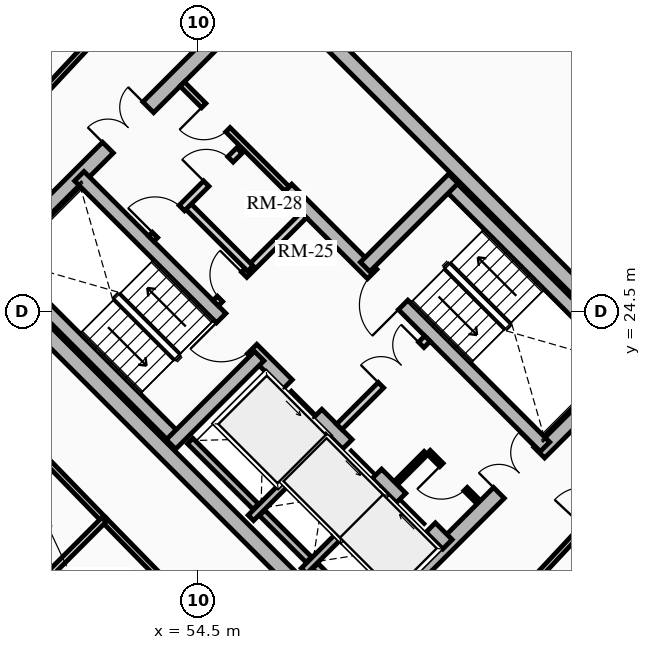
"""IFC4 building model, lengths in metres.
Left out: names, types, materials, properties, quantities, classifications, styles, units other than length and angle.
Written with IfcOpenShell. Run it as: python <this file> out.ifc"""

import sys

from ifc_helpers import new_model, si_unit, direction, frame, frame_2d, origin, place, context, subcontext, project, spatial, rectangle, extrude, source, transform, mapped, element, fill, save


model = new_model("IFC4")
c1 = context("Model", 3, precision=1e-05, world=origin(), true_north=direction((0.0, 1.0)))
c2 = subcontext(c1, "Body", "Model", "MODEL_VIEW")
j1 = project(units=[si_unit("LENGTHUNIT", "METRE"), si_unit("PLANEANGLEUNIT", "RADIAN")], contexts=[c1])
p1 = place(None, origin())
s1 = spatial("IfcSite", under=j1, at=p1, CompositionType="ELEMENT")
p2 = place(p1, origin())
s2 = spatial("IfcBuilding", under=s1, at=p2, CompositionType="ELEMENT")
p3 = place(p2, frame((0.0, 0.0, 157.42)))
s3 = spatial("IfcBuildingStorey", under=s2, at=p3, CompositionType="ELEMENT", Elevation=157.42)
for number, where, z_axis, x_axis in (
    (1, (58.702, 15.732, 0.0), (0.0, 0.0, 1.0), (-0.707, 0.707, 0.0)),
    (2, (66.268, 23.298, 0.0), (0.0, 0.0, 1.0), (-0.707, 0.707, 0.0)),
):
    element("IfcWall", number, at=place(p3, frame(where, z_axis=z_axis, x_axis=x_axis)), inside=s3, PredefinedType="SHEAR", context=c2, shape_type="SweptSolid", body=[
        extrude(rectangle(XDim=14.1, YDim=0.4, at=frame_2d((7.05, 0.0))), origin(), (0.0, 0.0, 1.0), 2.91),
    ])
p4 = place(p3, frame((58.561, 15.873, 0.0), z_axis=(0.0, 0.0, 1.0), x_axis=(0.707106781187, 0.707106781187, 0.0)))
e3 = element("IfcWall", 3, at=p4, inside=s3, PredefinedType="SHEAR", context=c2, shape_type="SweptSolid", body=[
    extrude(rectangle(XDim=10.7, YDim=0.4, at=frame_2d((5.35, 0.0))), origin(), (0.0, 0.0, 1.0), 2.91),
])
m1 = source(origin(), c2, "Body", "SweptSolid", [
    extrude(rectangle(XDim=1.5, YDim=2.02, at=frame_2d((0.75, 1.01))), frame((0.0, 0.21, 0.0), z_axis=(0.0, -1.0, 0.0), x_axis=(1.0, 0.0, 0.0)), (0.0, 0.0, 1.0), 0.42),
])
p5 = place(p4, frame((5.45, 0.0, 0.0)))
e4 = element("IfcOpeningElement", 4, at=p5, cuts=e3, PredefinedType="OPENING", context=c2, shape_type="MappedRepresentation", body=[
    mapped(m1, transform((0.0, 0.0, 0.0), x_axis=(1.0, 0.0, 0.0), y_axis=(0.0, 1.0, 0.0), z_axis=(0.0, 0.0, 1.0), scale=1.0)),
])
p6 = place(p3, frame((48.873, 25.561, 0.0), z_axis=(0.0, 0.0, 1.0), x_axis=(0.707106781187, 0.707106781187, 0.0)))
e5 = element("IfcWall", 5, at=p6, inside=s3, PredefinedType="SHEAR", context=c2, shape_type="SweptSolid", body=[
    extrude(rectangle(XDim=10.7, YDim=0.4, at=frame_2d((5.35, 0.0))), origin(), (0.0, 0.0, 1.0), 2.91),
])
p7 = place(p6, frame((4.6, 0.0, 0.0)))
e6 = element("IfcOpeningElement", 6, at=p7, cuts=e5, PredefinedType="OPENING", context=c2, shape_type="MappedRepresentation", body=[
    mapped(m1, transform((0.0, 0.0, 0.0), x_axis=(1.0, 0.0, 0.0), y_axis=(0.0, 1.0, 0.0), z_axis=(0.0, 0.0, 1.0), scale=1.0)),
])
p8 = place(p3, frame((61.06, 18.373, 0.0), z_axis=(0.0, 0.0, 1.0), x_axis=(-0.707106781187, 0.707106781187, 0.0)))
e7 = element("IfcWall", 7, at=p8, inside=s3, PredefinedType="SHEAR", context=c2, shape_type="SweptSolid", body=[
    extrude(rectangle(XDim=13.7, YDim=0.35, at=frame_2d((6.85, 0.0))), origin(), (0.0, 0.0, 1.0), 2.91),
])
m2 = source(origin(), c2, "Body", "SweptSolid", [
    extrude(rectangle(XDim=1.1, YDim=2.015, at=frame_2d((0.55, 1.007))), frame((0.0, 0.185, 0.0), z_axis=(0.0, -1.0, 0.0), x_axis=(1.0, 0.0, 0.0)), (0.0, 0.0, 1.0), 0.37),
])
p9 = place(p8, frame((4.85, 0.0, 0.0)))
e8 = element("IfcOpeningElement", 8, at=p9, cuts=e7, PredefinedType="OPENING", context=c2, shape_type="MappedRepresentation", body=[
    mapped(m2, transform((0.0, 0.0, 0.0), x_axis=(1.0, 0.0, 0.0), y_axis=(0.0, 1.0, 0.0), z_axis=(0.0, 0.0, 1.0), scale=1.0)),
])
p10 = place(p8, frame((0.625, 0.0, 0.0)))
e9 = element("IfcOpeningElement", 9, at=p10, cuts=e7, PredefinedType="OPENING", context=c2, shape_type="MappedRepresentation", body=[
    mapped(m2, transform((0.0, 0.0, 0.0), x_axis=(1.0, 0.0, 0.0), y_axis=(0.0, 1.0, 0.0), z_axis=(0.0, 0.0, 1.0), scale=1.0)),
])
p11 = place(p8, frame((2.625, 0.0, 0.0)))
e10 = element("IfcOpeningElement", 10, at=p11, cuts=e7, PredefinedType="OPENING", context=c2, shape_type="MappedRepresentation", body=[
    mapped(m2, transform((0.0, 0.0, 0.0), x_axis=(1.0, 0.0, 0.0), y_axis=(0.0, 1.0, 0.0), z_axis=(0.0, 0.0, 1.0), scale=1.0)),
])
m3 = source(origin(), c2, "Body", "SweptSolid", [
    extrude(rectangle(XDim=1.15, YDim=2.02, at=frame_2d((0.575, 1.01))), frame((0.0, 0.185, 0.0), z_axis=(0.0, -1.0, 0.0), x_axis=(1.0, 0.0, 0.0)), (0.0, 0.0, 1.0), 0.37),
])
p12 = place(p8, frame((7.27, 0.0, 0.0)))
e11 = element("IfcOpeningElement", 11, at=p12, cuts=e7, PredefinedType="OPENING", context=c2, shape_type="MappedRepresentation", body=[
    mapped(m3, transform((0.0, 0.0, 0.0), x_axis=(1.0, 0.0, 0.0), y_axis=(0.0, 1.0, 0.0), z_axis=(0.0, 0.0, 1.0), scale=1.0)),
])
p13 = place(p3, frame((63.627, 20.94, 0.0), z_axis=(0.0, 0.0, 1.0), x_axis=(-0.707119496762, 0.707094065383, 0.0)))
e12 = element("IfcWall", 12, at=p13, inside=s3, PredefinedType="SHEAR", context=c2, shape_type="SweptSolid", body=[
    extrude(rectangle(XDim=9.6, YDim=0.35, at=frame_2d((4.8, 0.0))), origin(), (0.0, 0.0, 1.0), 2.91),
])
p14 = place(p13, frame((5.28, 0.0, 0.0)))
e13 = element("IfcOpeningElement", 13, at=p14, cuts=e12, PredefinedType="OPENING", context=c2, shape_type="MappedRepresentation", body=[
    mapped(m3, transform((0.0, 0.0, 0.0), x_axis=(1.0, 0.0, 0.0), y_axis=(0.0, 1.0, 0.0), z_axis=(0.0, 0.0, 1.0), scale=1.0)),
])
p15 = place(p3, frame((53.922, 21.141, 0.0), z_axis=(0.0, 0.0, 1.0), x_axis=(-0.707106781187, 0.707106781187, 0.0)))
e14 = element("IfcWall", 14, at=p15, inside=s3, PredefinedType="SHEAR", context=c2, shape_type="SweptSolid", body=[
    extrude(rectangle(XDim=6.695, YDim=0.35, at=frame_2d((3.348, 0.0))), origin(), (0.0, 0.0, 1.0), 2.91),
])
p16 = place(p3, frame((53.784, 21.003, 0.0), z_axis=(0.0, 0.0, 1.0), x_axis=(0.707106781187, 0.707106781187, 0.0)))
e15 = element("IfcWall", 15, at=p16, inside=s3, PredefinedType="SHEAR", context=c2, shape_type="SweptSolid", body=[
    extrude(rectangle(XDim=3.285, YDim=0.35, at=frame_2d((1.643, 0.0))), origin(), (0.0, 0.0, 1.0), 2.91),
])
p17 = place(p3, frame((65.812, 23.125, 0.0), z_axis=(0.0, 0.0, 1.0), x_axis=(-0.707106781187, 0.707106781187, 0.0)))
e16 = element("IfcWall", 16, at=p17, inside=s3, PredefinedType="SHEAR", context=c2, shape_type="SweptSolid", body=[
    extrude(rectangle(XDim=6.695, YDim=0.35, at=frame_2d((3.348, 0.0))), origin(), (0.0, 0.0, 1.0), 2.91),
])
p18 = place(p3, frame((58.893, 25.674, 0.0), z_axis=(0.0, 0.0, 1.0), x_axis=(0.707106781187, 0.707106781187, 0.0)))
e17 = element("IfcWall", 17, at=p18, inside=s3, PredefinedType="SHEAR", context=c2, shape_type="SweptSolid", body=[
    extrude(rectangle(XDim=3.285, YDim=0.35, at=frame_2d((1.643, 0.0))), origin(), (0.0, 0.0, 1.0), 2.91),
])
p19 = place(p3, frame((55.888, 19.069, 0.0), z_axis=(0.0, 0.0, 1.0), x_axis=(0.707106781187, 0.707106781187, 0.0)))
e18 = element("IfcWall", 18, at=p19, inside=s3, PredefinedType="SHEAR", context=c2, shape_type="SweptSolid", body=[
    extrude(rectangle(XDim=2.97, YDim=0.2, at=frame_2d((1.485, 0.0))), origin(), (0.0, 0.0, 1.0), 2.91),
])
p20 = place(p3, frame((56.015, 19.366, 0.0), z_axis=(0.0, 0.0, 1.0), x_axis=(-0.707106781187, 0.707106781187, 0.0)))
e19 = element("IfcWall", 19, at=p20, inside=s3, PredefinedType="SHEAR", context=c2, shape_type="SweptSolid", body=[
    extrude(rectangle(XDim=2.44, YDim=0.2, at=frame_2d((1.22, 0.0))), origin(), (0.0, 0.0, 1.0), 2.91),
])
p21 = place(p3, frame((57.284, 17.673, 0.0), z_axis=(0.0, 0.0, 1.0), x_axis=(0.707147878904, 0.70706568108, 0.0)))
e20 = element("IfcWall", 20, at=p21, inside=s3, PredefinedType="SHEAR", context=c2, shape_type="SweptSolid", body=[
    extrude(rectangle(XDim=2.97, YDim=0.2, at=frame_2d((1.485, 0.0))), origin(), (0.0, 0.0, 1.0), 2.91),
])
p22 = place(p3, frame((57.412, 17.97, 0.0), z_axis=(0.0, 0.0, 1.0), x_axis=(-0.707106781187, 0.707106781187, 0.0)))
e21 = element("IfcWall", 21, at=p22, inside=s3, PredefinedType="SHEAR", context=c2, shape_type="SweptSolid", body=[
    extrude(rectangle(XDim=1.735, YDim=0.2, at=frame_2d((0.867, 0.0))), origin(), (0.0, 0.0, 1.0), 2.91),
])
p23 = place(p3, frame((58.737, 16.644, 0.0), z_axis=(0.0, 0.0, 1.0), x_axis=(-0.707032117043, 0.707181437447, 0.0)))
e22 = element("IfcWall", 22, at=p23, inside=s3, PredefinedType="SHEAR", context=c2, shape_type="SweptSolid", body=[
    extrude(rectangle(XDim=1.635, YDim=0.2, at=frame_2d((0.817, 0.0))), origin(), (0.0, 0.0, 1.0), 2.91),
])
p24 = place(p3, frame((58.214, 21.467, 0.0), z_axis=(0.0, 0.0, 1.0), x_axis=(0.707106781187, 0.707106781187, 0.0)))
e23 = element("IfcWall", 23, at=p24, inside=s3, PredefinedType="PARTITIONING", context=c2, shape_type="SweptSolid", body=[
    extrude(rectangle(XDim=3.28, YDim=0.2, at=frame_2d((1.64, 0.0))), origin(), (0.0, 0.0, 1.0), 2.675),
])
m4 = source(origin(), c2, "Body", "SweptSolid", [
    extrude(rectangle(XDim=1.5, YDim=2.02, at=frame_2d((0.75, 1.01))), frame((0.0, 0.11, 0.0), z_axis=(0.0, -1.0, 0.0), x_axis=(1.0, 0.0, 0.0)), (0.0, 0.0, 1.0), 0.22),
])
p25 = place(p24, frame((1.55, 0.0, 0.0)))
e24 = element("IfcOpeningElement", 24, at=p25, cuts=e23, PredefinedType="OPENING", context=c2, shape_type="MappedRepresentation", body=[
    mapped(m4, transform((0.0, 0.0, 0.0), x_axis=(1.0, 0.0, 0.0), y_axis=(0.0, 1.0, 0.0), z_axis=(0.0, 0.0, 1.0), scale=1.0)),
])
p26 = place(p3, frame((54.961, 24.719, 0.0), z_axis=(0.0, 0.0, 1.0), x_axis=(0.707106781187, 0.707106781187, 0.0)))
e25 = element("IfcWall", 25, at=p26, inside=s3, PredefinedType="PARTITIONING", context=c2, shape_type="SweptSolid", body=[
    extrude(rectangle(XDim=3.28, YDim=0.2, at=frame_2d((1.64, 0.0))), origin(), (0.0, 0.0, 1.0), 2.675),
])
m5 = source(origin(), c2, "Body", "SweptSolid", [
    extrude(rectangle(XDim=0.9, YDim=2.005, at=frame_2d((0.45, 1.002))), frame((0.0, 0.11, 0.0), z_axis=(0.0, -1.0, 0.0), x_axis=(1.0, 0.0, 0.0)), (0.0, 0.0, 1.0), 0.22),
])
p27 = place(p26, frame((0.16, 0.0, 0.0)))
e26 = element("IfcOpeningElement", 26, at=p27, cuts=e25, PredefinedType="OPENING", context=c2, shape_type="MappedRepresentation", body=[
    mapped(m5, transform((0.0, 0.0, 0.0), x_axis=(1.0, 0.0, 0.0), y_axis=(0.0, 1.0, 0.0), z_axis=(0.0, 0.0, 1.0), scale=1.0)),
])
p28 = place(p3, frame((55.874, 25.631, 0.0), z_axis=(0.0, 0.0, 1.0), x_axis=(-0.707157639372, 0.707055919343, 0.0)))
e27 = element("IfcWall", 27, at=p28, inside=s3, PredefinedType="PARTITIONING", context=c2, shape_type="SweptSolid", body=[
    extrude(rectangle(XDim=2.4, YDim=0.2, at=frame_2d((1.2, 0.0))), origin(), (0.0, 0.0, 1.0), 2.675),
])
p29 = place(p3, frame((53.264, 26.416, 0.0), z_axis=(0.0, 0.0, 1.0), x_axis=(0.707106781187, 0.707106781187, 0.0)))
e28 = element("IfcWall", 28, at=p29, inside=s3, PredefinedType="PARTITIONING", context=c2, shape_type="SweptSolid", body=[
    extrude(rectangle(XDim=3.28, YDim=0.2, at=frame_2d((1.64, 0.0))), origin(), (0.0, 0.0, 1.0), 2.675),
])
m6 = source(origin(), c2, "Body", "SweptSolid", [
    extrude(rectangle(XDim=1.0, YDim=2.015, at=frame_2d((0.5, 1.007))), frame((0.0, 0.11, 0.0), z_axis=(0.0, -1.0, 0.0), x_axis=(1.0, 0.0, 0.0)), (0.0, 0.0, 1.0), 0.22),
])
p30 = place(p29, frame((0.14, 0.0, 0.0)))
e29 = element("IfcOpeningElement", 29, at=p30, cuts=e28, PredefinedType="OPENING", context=c2, shape_type="MappedRepresentation", body=[
    mapped(m6, transform((0.0, 0.0, 0.0), x_axis=(1.0, 0.0, 0.0), y_axis=(0.0, 1.0, 0.0), z_axis=(0.0, 0.0, 1.0), scale=1.0)),
])
p31 = place(p29, frame((2.05, 0.0, 0.0)))
e30 = element("IfcOpeningElement", 30, at=p31, cuts=e28, PredefinedType="OPENING", context=c2, shape_type="MappedRepresentation", body=[
    mapped(m5, transform((0.0, 0.0, 0.0), x_axis=(1.0, 0.0, 0.0), y_axis=(0.0, 1.0, 0.0), z_axis=(0.0, 0.0, 1.0), scale=1.0)),
])
p32 = place(p3, frame((61.835, 19.529, 0.0), z_axis=(0.0, 0.0, 1.0), x_axis=(-0.707174592913, 0.707038962956, 0.0)))
e31 = element("IfcWall", 31, at=p32, inside=s3, PredefinedType="PARTITIONING", context=c2, shape_type="SweptSolid", body=[
    extrude(rectangle(XDim=1.8, YDim=0.125, at=frame_2d((0.9, 0.0))), origin(), (0.0, 0.0, 1.0), 2.675),
])
m7 = source(origin(), c2, "Body", "SweptSolid", [
    extrude(rectangle(XDim=0.9, YDim=2.005, at=frame_2d((0.45, 1.002))), frame((0.0, 0.073, 0.0), z_axis=(0.0, -1.0, 0.0), x_axis=(1.0, 0.0, 0.0)), (0.0, 0.0, 1.0), 0.145),
])
p33 = place(p32, frame((0.42, 0.0, 0.0)))
e32 = element("IfcOpeningElement", 32, at=p33, cuts=e31, PredefinedType="OPENING", context=c2, shape_type="MappedRepresentation", body=[
    mapped(m7, transform((0.0, 0.0, 0.0), x_axis=(1.0, 0.0, 0.0), y_axis=(0.0, 1.0, 0.0), z_axis=(0.0, 0.0, 1.0), scale=1.0)),
])
p34 = place(p3, frame((59.713, 19.996, 0.0), z_axis=(0.0, 0.0, 1.0), x_axis=(0.707217726, 0.706995818963, 0.0)))
e33 = element("IfcWall", 33, at=p34, inside=s3, PredefinedType="PARTITIONING", context=c2, shape_type="SweptSolid", body=[
    extrude(rectangle(XDim=1.1, YDim=0.125, at=frame_2d((0.55, 0.0))), origin(), (0.0, 0.0, 1.0), 2.675),
])
p35 = place(p3, frame((56.839, 27.728, 0.0), z_axis=(0.0, 0.0, 1.0), x_axis=(-0.707106781187, 0.707106781187, 0.0)))
e34 = element("IfcWall", 34, at=p35, inside=s3, PredefinedType="PARTITIONING", context=c2, shape_type="SweptSolid", body=[
    extrude(rectangle(XDim=3.9, YDim=0.16, at=frame_2d((1.95, 0.0))), origin(), (0.0, 0.0, 1.0), 2.675),
])
m8 = source(origin(), c2, "Body", "SweptSolid", [
    extrude(rectangle(XDim=0.9, YDim=2.005, at=frame_2d((0.45, 1.002))), frame((0.0, 0.09, 0.0), z_axis=(0.0, -1.0, 0.0), x_axis=(1.0, 0.0, 0.0)), (0.0, 0.0, 1.0), 0.18),
])
p36 = place(p35, frame((2.2, 0.0, 0.0)))
e35 = element("IfcOpeningElement", 35, at=p36, cuts=e34, PredefinedType="OPENING", context=c2, shape_type="MappedRepresentation", body=[
    mapped(m8, transform((0.0, 0.0, 0.0), x_axis=(1.0, 0.0, 0.0), y_axis=(0.0, 1.0, 0.0), z_axis=(0.0, 0.0, 1.0), scale=1.0)),
])
p37 = place(p3, frame((52.163, 32.117, 0.0), z_axis=(0.0, 0.0, 1.0), x_axis=(-0.682485296115, -0.730899323154, 0.0)))
e36 = element("IfcWall", 36, at=p37, inside=s3, PredefinedType="PARTITIONING", context=c2, shape_type="SweptSolid", body=[
    extrude(rectangle(XDim=6.404, YDim=0.15, at=frame_2d((3.202, 0.0))), origin(), (0.0, 0.0, 1.0), 2.245),
])
p38 = place(p3, frame((47.901, 23.265, 0.0), z_axis=(0.0, 0.0, 1.0), x_axis=(0.696355965374, -0.717696572019, 0.0)))
e37 = element("IfcWall", 37, at=p38, inside=s3, PredefinedType="PARTITIONING", context=c2, shape_type="SweptSolid", body=[
    extrude(rectangle(XDim=5.915, YDim=0.15, at=frame_2d((2.957, 0.0))), origin(), (0.0, 0.0, 1.0), 2.675),
])
p39 = place(p3, frame((52.02, 19.02, 0.0), z_axis=(0.0, 0.0, 1.0), x_axis=(0.699456449804, -0.71467522332, 0.0)))
e38 = element("IfcWall", 38, at=p39, inside=s3, PredefinedType="PARTITIONING", context=c2, shape_type="SweptSolid", body=[
    extrude(rectangle(XDim=6.032, YDim=0.15, at=frame_2d((3.016, 0.0))), origin(), (0.0, 0.0, 1.0), 2.245),
])
p40 = place(p3, frame((62.784, 16.83, 0.0), z_axis=(0.0, 0.0, 1.0), x_axis=(0.682240832942, 0.731127516831, 0.0)))
e39 = element("IfcWall", 39, at=p40, inside=s3, PredefinedType="PARTITIONING", context=c2, shape_type="SweptSolid", body=[
    extrude(rectangle(XDim=6.517, YDim=0.15, at=frame_2d((3.259, 0.0))), origin(), (0.0, 0.0, 1.0), 2.245),
])
m9 = source(origin(), c2, "Body", "SweptSolid", [
    extrude(rectangle(XDim=1.05, YDim=2.015, at=frame_2d((0.525, 1.007))), frame((0.0, 0.085, 0.0), z_axis=(0.0, -1.0, 0.0), x_axis=(1.0, 0.0, 0.0)), (0.0, 0.0, 1.0), 0.17),
])
p41 = place(p40, frame((2.734, 0.0, 0.0)))
e40 = element("IfcOpeningElement", 40, at=p41, cuts=e39, PredefinedType="OPENING", context=c2, shape_type="MappedRepresentation", body=[
    mapped(m9, transform((0.0, 0.0, 0.0), x_axis=(1.0, 0.0, 0.0), y_axis=(0.0, 1.0, 0.0), z_axis=(0.0, 0.0, 1.0), scale=1.0)),
])
p42 = place(p3, frame((52.02, 19.02, 0.0), z_axis=(0.0, 0.0, 1.0), x_axis=(-0.707106781187, -0.707106781187, 0.0)))
e41 = element("IfcWall", 41, at=p42, inside=s3, PredefinedType="PARTITIONING", context=c2, shape_type="SweptSolid", body=[
    extrude(rectangle(XDim=6.745, YDim=0.16, at=frame_2d((3.373, 0.0))), origin(), (0.0, 0.0, 1.0), 2.245),
])
m10 = source(origin(), c2, "Body", "SweptSolid", [
    extrude(rectangle(XDim=1.1, YDim=2.015, at=frame_2d((0.55, 1.007))), frame((0.0, 0.025, 0.0), z_axis=(0.0, -1.0, 0.0), x_axis=(1.0, 0.0, 0.0)), (0.0, 0.0, 1.0), 0.05),
])
p43 = place(p9, origin())
e42 = element("IfcDoor", 42, at=p43, inside=s3, OperationType="SLIDING_TO_LEFT", PredefinedType="DOOR", context=c2, shape_type="MappedRepresentation", body=[
    mapped(m10, transform((0.0, 0.0, 0.0), x_axis=(1.0, 0.0, 0.0), y_axis=(0.0, 1.0, 0.0), z_axis=(0.0, 0.0, 1.0), scale=1.0)),
])
fill(e8, e42)
p44 = place(p10, origin())
e43 = element("IfcDoor", 43, at=p44, inside=s3, OperationType="SLIDING_TO_RIGHT", PredefinedType="DOOR", context=c2, shape_type="MappedRepresentation", body=[
    mapped(m10, transform((0.0, 0.0, 0.0), x_axis=(1.0, 0.0, 0.0), y_axis=(0.0, 1.0, 0.0), z_axis=(0.0, 0.0, 1.0), scale=1.0)),
])
fill(e9, e43)
p45 = place(p11, origin())
e44 = element("IfcDoor", 44, at=p45, inside=s3, OperationType="SLIDING_TO_LEFT", PredefinedType="DOOR", context=c2, shape_type="MappedRepresentation", body=[
    mapped(m10, transform((0.0, 0.0, 0.0), x_axis=(1.0, 0.0, 0.0), y_axis=(0.0, 1.0, 0.0), z_axis=(0.0, 0.0, 1.0), scale=1.0)),
])
fill(e10, e44)
m11 = source(origin(), c2, "Body", "SweptSolid", [
    extrude(rectangle(XDim=1.15, YDim=2.02, at=frame_2d((0.575, 1.01))), frame((0.0, 0.025, 0.0), z_axis=(0.0, -1.0, 0.0), x_axis=(1.0, 0.0, 0.0)), (0.0, 0.0, 1.0), 0.05),
])
p46 = place(p12, origin())
e45 = element("IfcDoor", 45, at=p46, inside=s3, OperationType="SINGLE_SWING_RIGHT", PredefinedType="DOOR", context=c2, shape_type="MappedRepresentation", body=[
    mapped(m11, transform((0.0, 0.0, 0.0), x_axis=(1.0, 0.0, 0.0), y_axis=(0.0, 1.0, 0.0), z_axis=(0.0, 0.0, 1.0), scale=1.0)),
])
fill(e11, e45)
p47 = place(p14, origin())
e46 = element("IfcDoor", 46, at=p47, inside=s3, OperationType="SINGLE_SWING_LEFT", PredefinedType="DOOR", context=c2, shape_type="MappedRepresentation", body=[
    mapped(m11, transform((0.0, 0.0, 0.0), x_axis=(1.0, 0.0, 0.0), y_axis=(0.0, 1.0, 0.0), z_axis=(0.0, 0.0, 1.0), scale=1.0)),
])
fill(e13, e46)
m12 = source(origin(), c2, "Body", "SweptSolid", [
    extrude(rectangle(XDim=1.5, YDim=2.02, at=frame_2d((0.75, 1.01))), frame((0.0, 0.025, 0.0), z_axis=(0.0, -1.0, 0.0), x_axis=(1.0, 0.0, 0.0)), (0.0, 0.0, 1.0), 0.05),
])
p48 = place(p7, origin())
e47 = element("IfcDoor", 47, at=p48, inside=s3, OperationType="DOUBLE_DOOR_SINGLE_SWING", PredefinedType="DOOR", context=c2, shape_type="MappedRepresentation", body=[
    mapped(m12, transform((0.0, 0.0, 0.0), x_axis=(1.0, 0.0, 0.0), y_axis=(0.0, 1.0, 0.0), z_axis=(0.0, 0.0, 1.0), scale=1.0)),
])
fill(e6, e47)
p49 = place(p5, origin())
e48 = element("IfcDoor", 48, at=p49, inside=s3, OperationType="DOUBLE_DOOR_SINGLE_SWING", PredefinedType="DOOR", context=c2, shape_type="MappedRepresentation", body=[
    mapped(m12, transform((0.0, 0.0, 0.0), x_axis=(1.0, 0.0, 0.0), y_axis=(0.0, 1.0, 0.0), z_axis=(0.0, 0.0, 1.0), scale=1.0)),
])
fill(e4, e48)
p50 = place(p25, origin())
e49 = element("IfcDoor", 49, at=p50, inside=s3, OperationType="DOUBLE_DOOR_SINGLE_SWING", PredefinedType="DOOR", context=c2, shape_type="MappedRepresentation", body=[
    mapped(m12, transform((0.0, 0.0, 0.0), x_axis=(1.0, 0.0, 0.0), y_axis=(0.0, 1.0, 0.0), z_axis=(0.0, 0.0, 1.0), scale=1.0)),
])
fill(e24, e49)
m13 = source(origin(), c2, "Body", "SweptSolid", [
    extrude(rectangle(XDim=0.9, YDim=2.005, at=frame_2d((0.45, 1.002))), frame((0.0, 0.025, 0.0), z_axis=(0.0, -1.0, 0.0), x_axis=(1.0, 0.0, 0.0)), (0.0, 0.0, 1.0), 0.05),
])
p51 = place(p27, origin())
e50 = element("IfcDoor", 50, at=p51, inside=s3, OperationType="SINGLE_SWING_RIGHT", PredefinedType="DOOR", context=c2, shape_type="MappedRepresentation", body=[
    mapped(m13, transform((0.0, 0.0, 0.0), x_axis=(1.0, 0.0, 0.0), y_axis=(0.0, 1.0, 0.0), z_axis=(0.0, 0.0, 1.0), scale=1.0)),
])
fill(e26, e50)
m14 = source(origin(), c2, "Body", "SweptSolid", [
    extrude(rectangle(XDim=1.0, YDim=2.015, at=frame_2d((0.5, 1.007))), frame((0.0, 0.025, 0.0), z_axis=(0.0, -1.0, 0.0), x_axis=(1.0, 0.0, 0.0)), (0.0, 0.0, 1.0), 0.05),
])
p52 = place(p30, origin())
e51 = element("IfcDoor", 51, at=p52, inside=s3, OperationType="SINGLE_SWING_LEFT", PredefinedType="DOOR", context=c2, shape_type="MappedRepresentation", body=[
    mapped(m14, transform((0.0, 0.0, 0.0), x_axis=(1.0, 0.0, 0.0), y_axis=(0.0, 1.0, 0.0), z_axis=(0.0, 0.0, 1.0), scale=1.0)),
])
fill(e29, e51)
p53 = place(p33, origin())
e52 = element("IfcDoor", 52, at=p53, inside=s3, OperationType="SINGLE_SWING_RIGHT", PredefinedType="DOOR", context=c2, shape_type="MappedRepresentation", body=[
    mapped(m13, transform((0.0, 0.0, 0.0), x_axis=(1.0, 0.0, 0.0), y_axis=(0.0, 1.0, 0.0), z_axis=(0.0, 0.0, 1.0), scale=1.0)),
])
fill(e32, e52)
p54 = place(p31, origin())
e53 = element("IfcDoor", 53, at=p54, inside=s3, OperationType="SINGLE_SWING_LEFT", PredefinedType="DOOR", context=c2, shape_type="MappedRepresentation", body=[
    mapped(m13, transform((0.0, 0.0, 0.0), x_axis=(1.0, 0.0, 0.0), y_axis=(0.0, 1.0, 0.0), z_axis=(0.0, 0.0, 1.0), scale=1.0)),
])
fill(e30, e53)
p55 = place(p36, origin())
e54 = element("IfcDoor", 54, at=p55, inside=s3, OperationType="SINGLE_SWING_RIGHT", PredefinedType="DOOR", context=c2, shape_type="MappedRepresentation", body=[
    mapped(m13, transform((0.0, 0.0, 0.0), x_axis=(1.0, 0.0, 0.0), y_axis=(0.0, 1.0, 0.0), z_axis=(0.0, 0.0, 1.0), scale=1.0)),
])
fill(e35, e54)
save(model, sys.argv[1])
